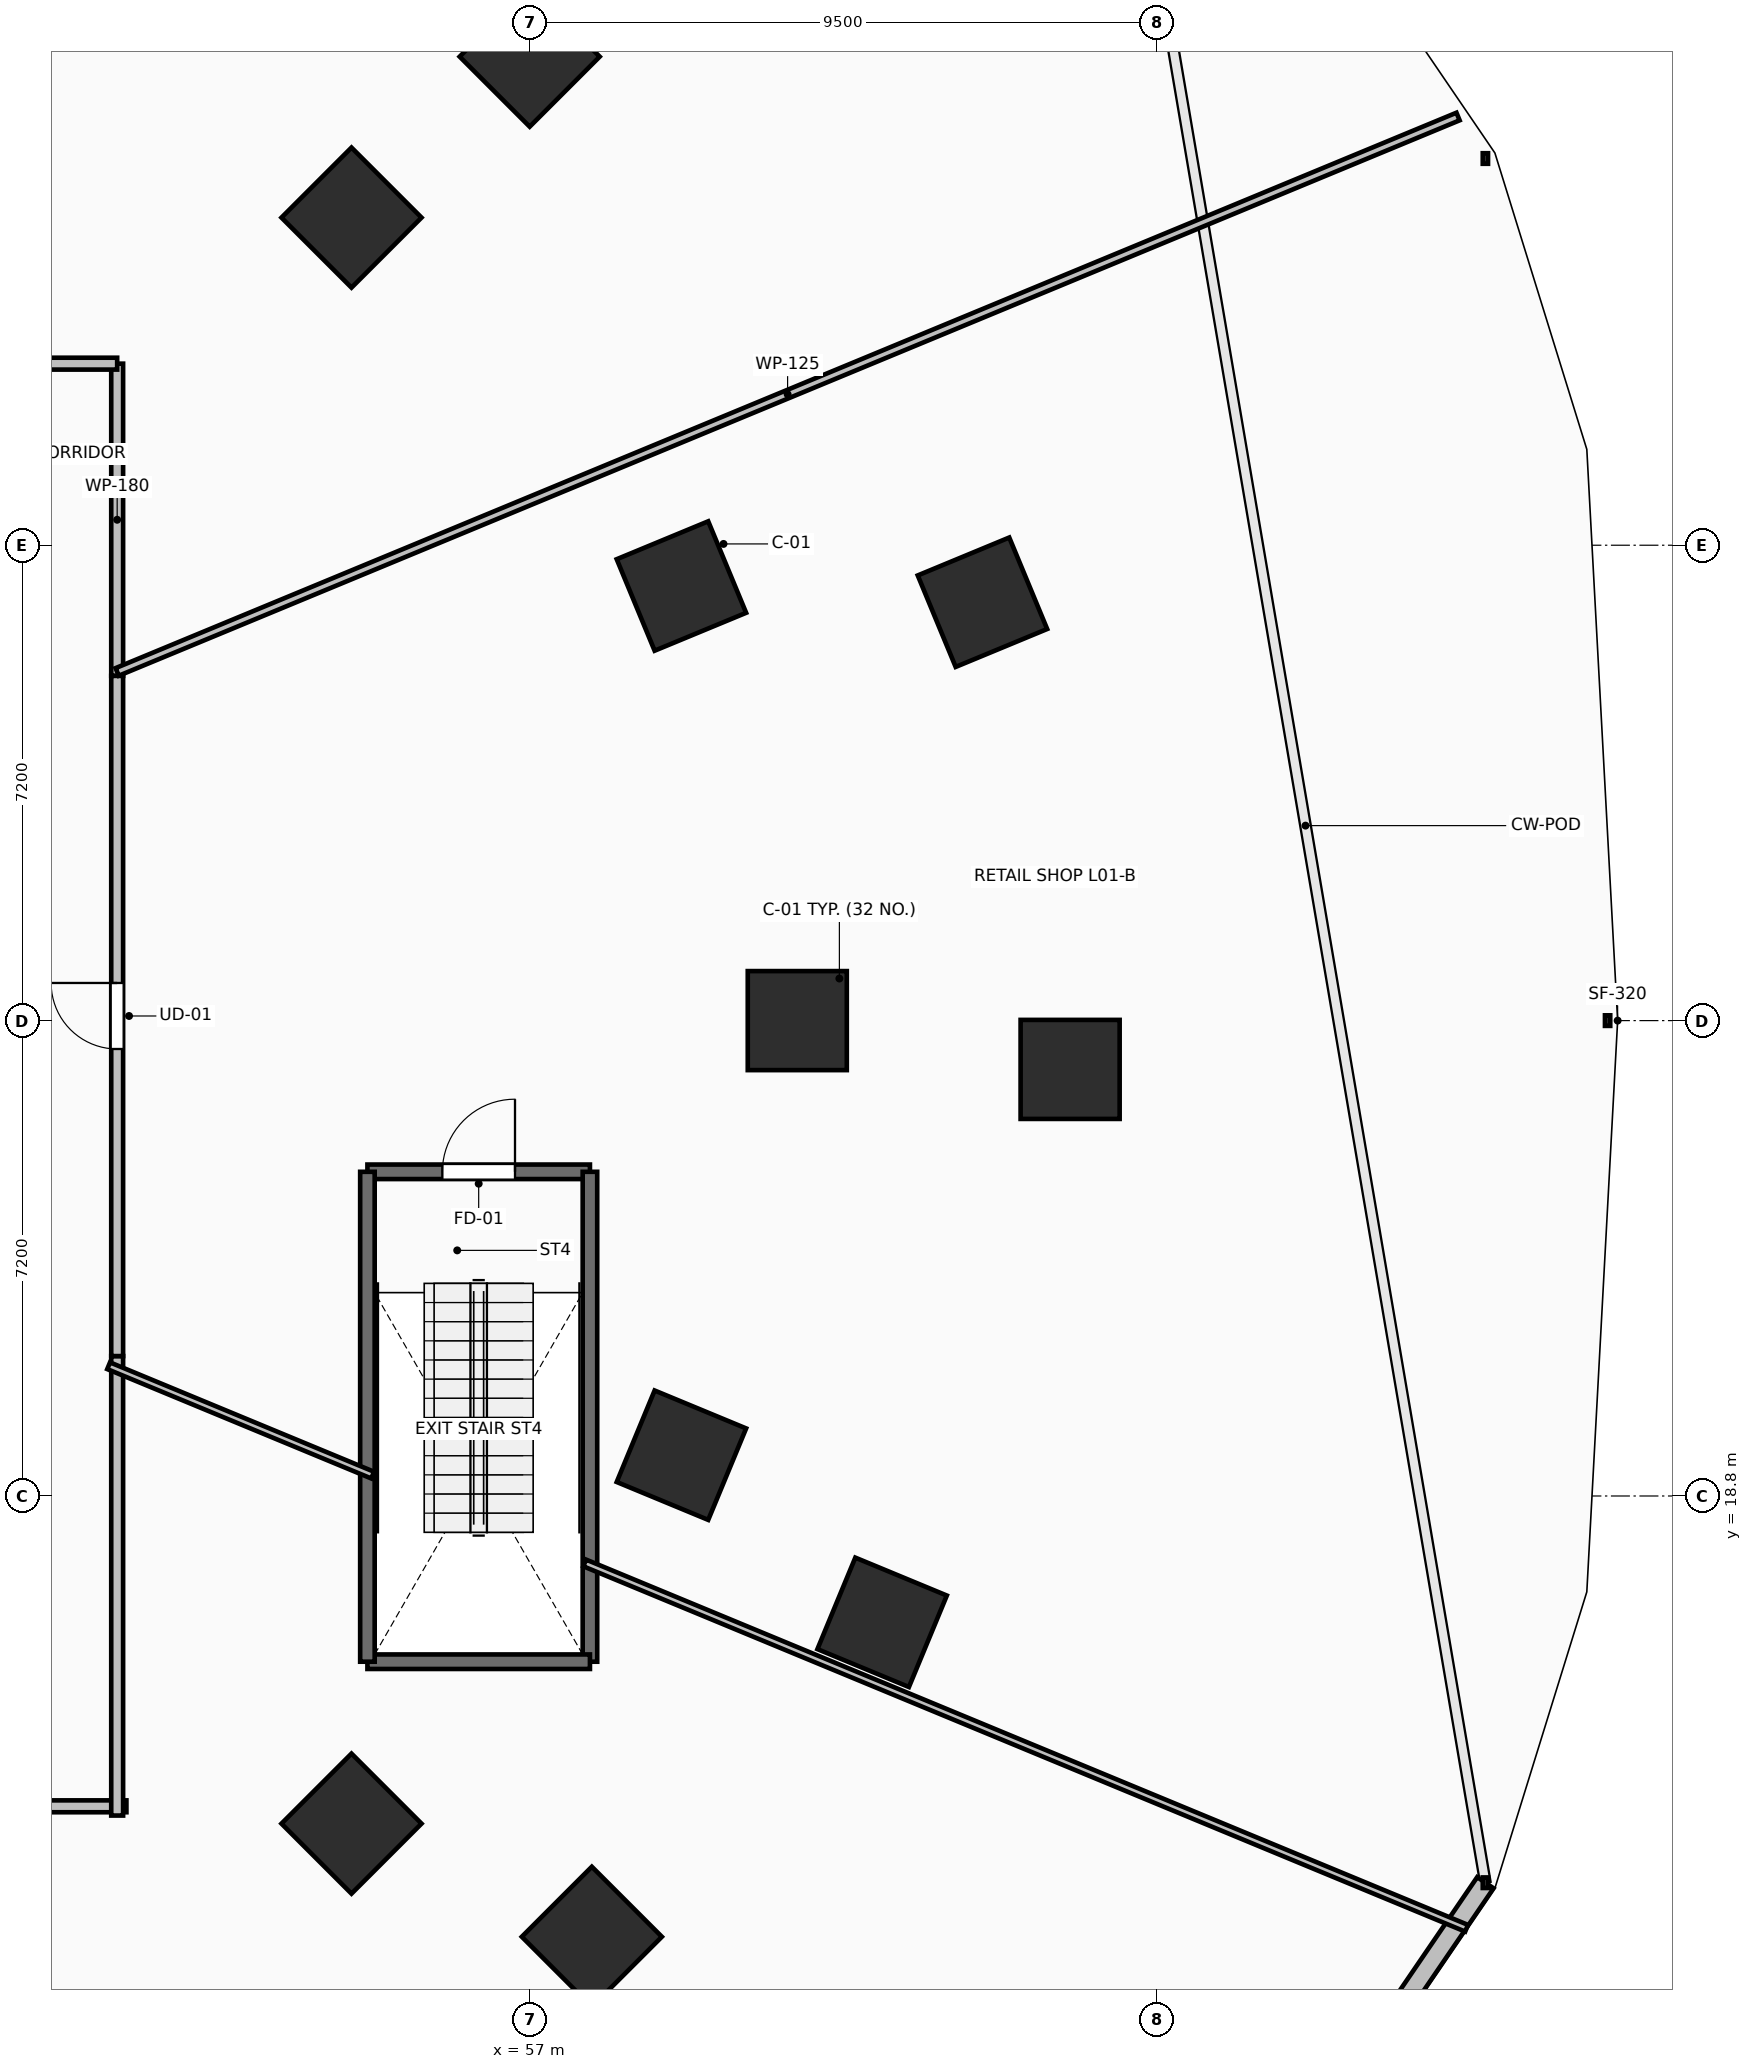
"""IFC4 building model, lengths in metres.
Left out: names, types, materials, properties, quantities, classifications, styles, units other than length and angle.
Written with IfcOpenShell. Run it as: python <this file> out.ifc"""

import sys

from ifc_helpers import new_model, si_unit, direction, frame, frame_2d, origin, origin_2d, place, context, subcontext, project, spatial, rectangle, extrude, element, fill, save


model = new_model("IFC4")
c1 = context("Model", 3, precision=1e-05, world=origin(), true_north=direction((0.0, 1.0)))
c2 = subcontext(c1, "Body", "Model", "MODEL_VIEW")
j1 = project(units=[si_unit("LENGTHUNIT", "METRE"), si_unit("PLANEANGLEUNIT", "RADIAN")], contexts=[c1])
p1 = place(None, origin())
s1 = spatial("IfcSite", under=j1, at=p1, CompositionType="ELEMENT")
p2 = place(p1, origin())
s2 = spatial("IfcBuilding", under=s1, at=p2, CompositionType="ELEMENT")
p3 = place(p2, frame((0.0, 0.0, 4.8)))
s3 = spatial("IfcBuildingStorey", under=s2, at=p3, CompositionType="ELEMENT", Elevation=4.8)
for number, where, z_axis, x_axis in (
    (1, (61.05, 26.0, 0.0), (0.0, 0.0, 1.0), (1.0, 0.0, 0.0)),
    (2, (59.295, 32.582, 0.0), (0.0, 0.0, 1.0), (0.924, 0.383, 0.0)),
    (3, (54.299, 38.162, 0.0), (0.0, 0.0, 1.0), (0.707, 0.707, 0.0)),
    (4, (54.299, 13.838, 0.0), (0.0, 0.0, 1.0), (0.707, -0.707, 0.0)),
    (5, (59.295, 19.418, 0.0), (0.0, 0.0, 1.0), (0.924, -0.383, 0.0)),
    (6, (65.182, 25.261, 0.0), (0.0, 0.0, 1.0), (1.0, 0.0, 0.0)),
    (7, (63.854, 32.337, 0.0), (0.0, 0.0, 1.0), (0.924, 0.383, 0.0)),
    (8, (56.997, 40.6, 0.0), (0.0, 0.0, 1.0), (0.707, 0.707, 0.0)),
    (9, (57.939, 12.124, 0.0), (0.0, 0.0, 1.0), (0.707, -0.707, 0.0)),
    (10, (62.335, 16.886, 0.0), (0.0, 0.0, 1.0), (0.924, -0.383, 0.0)),
):
    element("IfcColumn", number, at=place(p3, frame(where, z_axis=z_axis, x_axis=x_axis)), inside=s3, PredefinedType="COLUMN", context=c2, shape_type="SweptSolid", body=[
        extrude(rectangle(XDim=1.5, YDim=1.5, at=origin_2d()), origin(), (0.0, 0.0, 1.0), 4.8),
    ])
p4 = place(p3, frame((69.187, 9.596, 0.0), z_axis=(0.0, 0.0, 1.0), x_axis=(0.563802284854, 0.825909791438, 0.0)))
e11 = element("IfcWall", 11, at=p4, inside=s3, PredefinedType="STANDARD", context=c2, shape_type="SweptSolid", body=[
    extrude(rectangle(XDim=4.052, YDim=0.3, at=frame_2d((2.026, 0.0))), origin(), (0.0, 0.0, 1.0), 4.48),
])
p5 = place(p3, frame((54.54, 23.71, 0.0), z_axis=(0.0, 0.0, 1.0), x_axis=(1.0, 0.0, 0.0)))
e12 = element("IfcWall", 12, at=p5, inside=s3, PredefinedType="SOLIDWALL", context=c2, shape_type="SweptSolid", body=[
    extrude(rectangle(XDim=3.37, YDim=0.22, at=frame_2d((1.685, 0.0))), origin(), (0.0, 0.0, 1.0), 4.48),
])
p6 = place(p5, frame((1.135, 0.0, 0.0)))
e13 = element("IfcOpeningElement", 13, at=p6, cuts=e12, PredefinedType="OPENING", context=c2, shape_type="SweptSolid", body=[
    extrude(rectangle(XDim=1.1, YDim=2.15, at=frame_2d((0.55, 1.075))), frame((0.0, 0.125, 0.0), z_axis=(0.0, -1.0, 0.0), x_axis=(1.0, 0.0, 0.0)), (0.0, 0.0, 1.0), 0.25),
])
p7 = place(p3, frame((57.91, 23.71, 0.0), z_axis=(0.0, 0.0, 1.0), x_axis=(0.0, -1.0, 0.0)))
e14 = element("IfcWall", 14, at=p7, inside=s3, PredefinedType="SOLIDWALL", context=c2, shape_type="SweptSolid", body=[
    extrude(rectangle(XDim=7.42, YDim=0.22, at=frame_2d((3.71, 0.0))), origin(), (0.0, 0.0, 1.0), 4.48),
])
p8 = place(p3, frame((57.91, 16.29, 0.0), z_axis=(0.0, 0.0, 1.0), x_axis=(-1.0, 0.0, 0.0)))
e15 = element("IfcWall", 15, at=p8, inside=s3, PredefinedType="SOLIDWALL", context=c2, shape_type="SweptSolid", body=[
    extrude(rectangle(XDim=3.37, YDim=0.22, at=frame_2d((1.685, 0.0))), origin(), (0.0, 0.0, 1.0), 4.48),
])
p9 = place(p3, frame((54.54, 16.29, 0.0), z_axis=(0.0, 0.0, 1.0), x_axis=(0.0, 1.0, 0.0)))
e16 = element("IfcWall", 16, at=p9, inside=s3, PredefinedType="SOLIDWALL", context=c2, shape_type="SweptSolid", body=[
    extrude(rectangle(XDim=7.42, YDim=0.22, at=frame_2d((3.71, 0.0))), origin(), (0.0, 0.0, 1.0), 4.48),
])
p10 = place(p3, frame((50.75, 31.221, 0.0), z_axis=(0.0, 0.0, 1.0), x_axis=(0.0, 1.0, 0.0)))
e17 = element("IfcWall", 17, at=p10, inside=s3, PredefinedType="PARTITIONING", context=c2, shape_type="SweptSolid", body=[
    extrude(rectangle(XDim=4.729, YDim=0.18, at=frame_2d((2.365, 0.0))), origin(), (0.0, 0.0, 1.0), 3.672),
])
p11 = place(p3, frame((50.75, 35.95, 0.0), z_axis=(0.0, 0.0, 1.0), x_axis=(-1.0, 0.0, 0.0)))
e18 = element("IfcWall", 18, at=p11, inside=s3, PredefinedType="PARTITIONING", context=c2, shape_type="SweptSolid", body=[
    extrude(rectangle(XDim=12.81, YDim=0.18, at=frame_2d((6.405, 0.0))), origin(), (0.0, 0.0, 1.0), 3.672),
])
p12 = place(p11, frame((5.905, 0.0, 0.0)))
e19 = element("IfcOpeningElement", 19, at=p12, cuts=e18, PredefinedType="OPENING", context=c2, shape_type="SweptSolid", body=[
    extrude(rectangle(XDim=1.0, YDim=2.15, at=frame_2d((0.5, 1.075))), frame((0.0, 0.105, 0.0), z_axis=(0.0, -1.0, 0.0), x_axis=(1.0, 0.0, 0.0)), (0.0, 0.0, 1.0), 0.21),
])
p13 = place(p3, frame((42.854, 14.1, 0.0), z_axis=(0.0, 0.0, 1.0), x_axis=(1.0, 0.0, 0.0)))
e20 = element("IfcWall", 20, at=p13, inside=s3, PredefinedType="PARTITIONING", context=c2, shape_type="SweptSolid", body=[
    extrude(rectangle(XDim=8.036, YDim=0.18, at=frame_2d((4.018, 0.0))), origin(), (0.0, 0.0, 1.0), 3.672),
])
p14 = place(p13, frame((3.518, 0.0, 0.0)))
e21 = element("IfcOpeningElement", 21, at=p14, cuts=e20, PredefinedType="OPENING", context=c2, shape_type="SweptSolid", body=[
    extrude(rectangle(XDim=1.0, YDim=2.15, at=frame_2d((0.5, 1.075))), frame((0.0, 0.105, 0.0), z_axis=(0.0, -1.0, 0.0), x_axis=(1.0, 0.0, 0.0)), (0.0, 0.0, 1.0), 0.21),
])
p15 = place(p3, frame((50.75, 13.96, 0.0), z_axis=(0.0, 0.0, 1.0), x_axis=(0.0, 1.0, 0.0)))
e22 = element("IfcWall", 22, at=p15, inside=s3, PredefinedType="PARTITIONING", context=c2, shape_type="SweptSolid", body=[
    extrude(rectangle(XDim=6.959, YDim=0.18, at=frame_2d((3.479, 0.0))), origin(), (0.0, 0.0, 1.0), 3.672),
])
p16 = place(p3, frame((50.75, 20.919, 0.0), z_axis=(0.0, 0.0, 1.0), x_axis=(0.0, 1.0, 0.0)))
e23 = element("IfcWall", 23, at=p16, inside=s3, PredefinedType="PARTITIONING", context=c2, shape_type="SweptSolid", body=[
    extrude(rectangle(XDim=10.302, YDim=0.18, at=frame_2d((5.151, 0.0))), origin(), (0.0, 0.0, 1.0), 3.672),
])
p17 = place(p16, frame((4.651, 0.0, 0.0)))
e24 = element("IfcOpeningElement", 24, at=p17, cuts=e23, PredefinedType="OPENING", context=c2, shape_type="SweptSolid", body=[
    extrude(rectangle(XDim=1.0, YDim=2.15, at=frame_2d((0.5, 1.075))), frame((0.0, 0.105, 0.0), z_axis=(0.0, -1.0, 0.0), x_axis=(1.0, 0.0, 0.0)), (0.0, 0.0, 1.0), 0.21),
])
p18 = place(p3, frame((50.75, 31.281, 0.0), z_axis=(0.0, 0.0, 1.0), x_axis=(0.923867913948, 0.382711480854, 0.0)))
e25 = element("IfcWall", 25, at=p18, inside=s3, PredefinedType="PARTITIONING", context=c2, shape_type="SweptSolid", body=[
    extrude(rectangle(XDim=21.98, YDim=0.125, at=frame_2d((10.99, 0.0))), origin(), (0.0, 0.0, 1.0), 3.672),
])
p19 = place(p3, frame((54.619, 19.116, 0.0), z_axis=(0.0, 0.0, 1.0), x_axis=(-0.923887587975, 0.382663984176, 0.0)))
e26 = element("IfcWall", 26, at=p19, inside=s3, PredefinedType="PARTITIONING", context=c2, shape_type="SweptSolid", body=[
    extrude(rectangle(XDim=4.328, YDim=0.11, at=frame_2d((2.164, 0.0))), origin(), (0.0, 0.0, 1.0), 4.48),
])
p20 = place(p3, frame((71.186, 12.253, 0.0), z_axis=(0.0, 0.0, 1.0), x_axis=(-0.92387438968, 0.382695848021, 0.0)))
e27 = element("IfcWall", 27, at=p20, inside=s3, PredefinedType="PARTITIONING", context=c2, shape_type="SweptSolid", body=[
    extrude(rectangle(XDim=14.456, YDim=0.11, at=frame_2d((7.228, 0.0))), origin(), (0.0, 0.0, 1.0), 3.769),
])
p21 = place(p6, origin())
e28 = element("IfcDoor", 28, at=p21, inside=s3, OperationType="SINGLE_SWING_RIGHT", PredefinedType="DOOR", context=c2, shape_type="SweptSolid", body=[
    extrude(rectangle(XDim=1.1, YDim=2.15, at=frame_2d((0.55, 1.075))), frame((0.0, 0.025, 0.0), z_axis=(0.0, -1.0, 0.0), x_axis=(1.0, 0.0, 0.0)), (0.0, 0.0, 1.0), 0.05),
])
fill(e13, e28)
p22 = place(p17, origin())
e29 = element("IfcDoor", 29, at=p22, inside=s3, OperationType="SINGLE_SWING_RIGHT", PredefinedType="DOOR", context=c2, shape_type="SweptSolid", body=[
    extrude(rectangle(XDim=1.0, YDim=2.15, at=frame_2d((0.5, 1.075))), frame((0.0, 0.025, 0.0), z_axis=(0.0, -1.0, 0.0), x_axis=(1.0, 0.0, 0.0)), (0.0, 0.0, 1.0), 0.05),
])
fill(e24, e29)
save(model, sys.argv[1])
